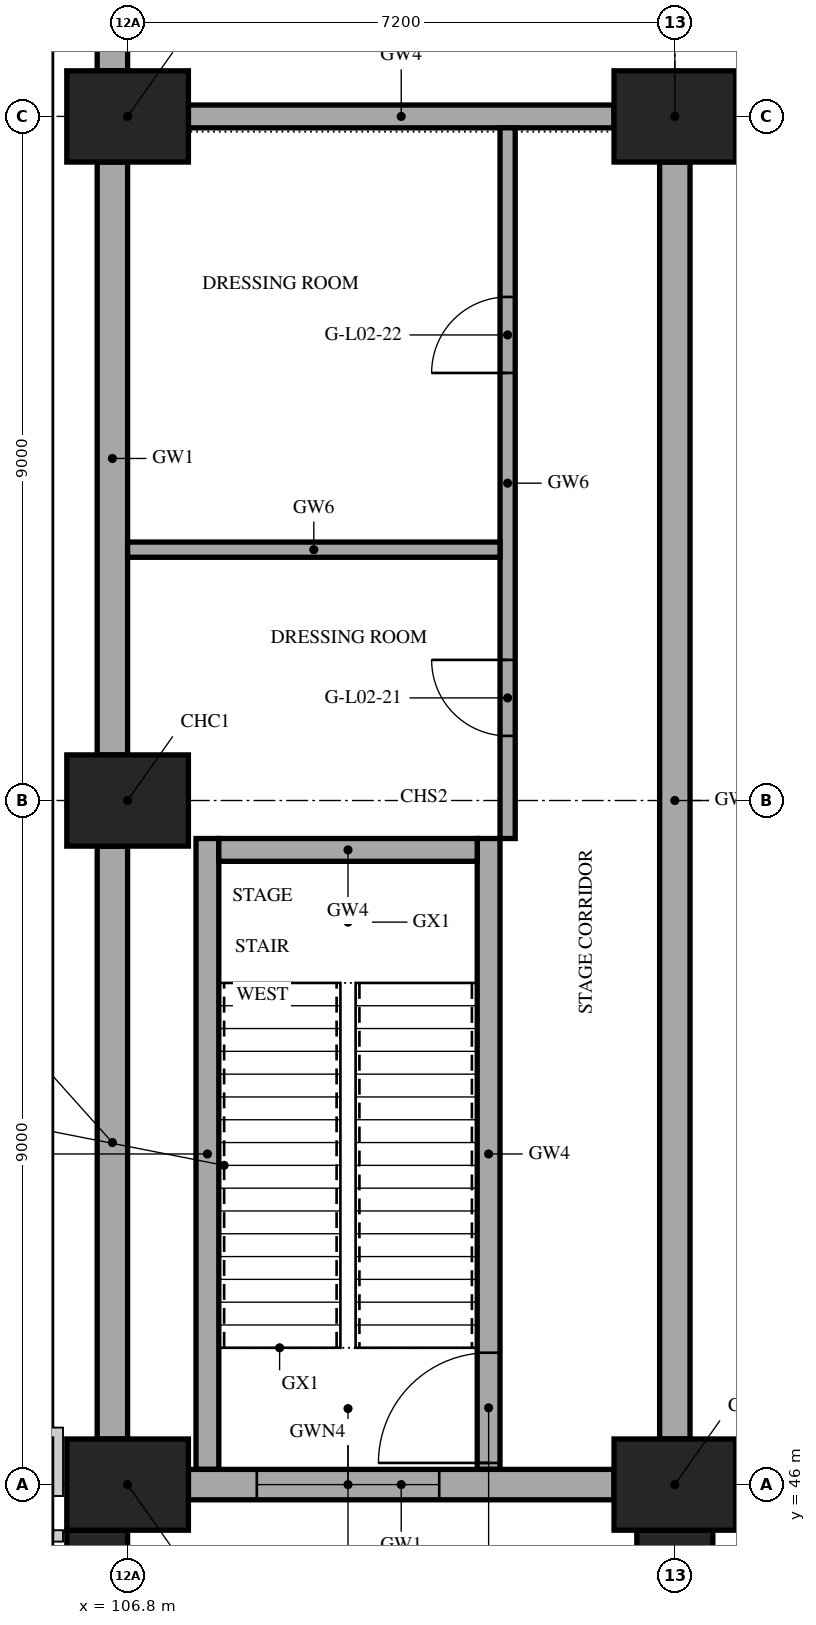
"""IFC4 building model, lengths in metres.
Left out: names, types, materials, properties, quantities, classifications, styles, units other than length and angle.
Written with IfcOpenShell. Run it as: python <this file> out.ifc"""

import sys

from ifc_helpers import new_model, si_unit, direction, frame, frame_2d, origin, origin_2d, place, context, subcontext, project, spatial, rectangle, extrude, element, fill, save


model = new_model("IFC4")
c1 = context("Model", 3, precision=1e-05, world=origin(), true_north=direction((0.0, 1.0)))
c2 = subcontext(c1, "Body", "Model", "MODEL_VIEW")
j1 = project(units=[si_unit("LENGTHUNIT", "METRE"), si_unit("PLANEANGLEUNIT", "RADIAN")], contexts=[c1])
p1 = place(None, origin())
s1 = spatial("IfcSite", under=j1, at=p1, CompositionType="ELEMENT")
p2 = place(p1, origin())
s2 = spatial("IfcBuilding", under=s1, at=p2, CompositionType="ELEMENT")
p3 = place(p2, frame((0.0, 0.0, 10.0)))
s3 = spatial("IfcBuildingStorey", under=s2, at=p3, CompositionType="ELEMENT", Elevation=10.0)
p4 = place(p3, frame((106.4, 44.9, 0.0), z_axis=(0.0, 0.0, 1.0), x_axis=(1.0, 0.0, 0.0)))
e1 = element("IfcColumn", 1, at=p4, inside=s3, PredefinedType="COLUMN", context=c2, shape_type="SweptSolid", body=[
    extrude(rectangle(XDim=0.8, YDim=1.0, at=origin_2d()), origin(), (0.0, 0.0, 1.0), 3.4),
])
p5 = place(p3, frame((114.0, 44.9, 0.0), z_axis=(0.0, 0.0, 1.0), x_axis=(1.0, 0.0, 0.0)))
e2 = element("IfcColumn", 2, at=p5, inside=s3, PredefinedType="COLUMN", context=c2, shape_type="SweptSolid", body=[
    extrude(rectangle(XDim=1.0, YDim=1.0, at=origin_2d()), origin(), (0.0, 0.0, 1.0), 3.4),
])
for number, where, z_axis, x_axis in (
    (3, (106.8, 46.0, 0.0), (0.0, 0.0, 1.0), (1.0, 0.0, 0.0)),
    (4, (114.0, 46.0, 0.0), (0.0, 0.0, 1.0), (1.0, 0.0, 0.0)),
    (5, (106.8, 55.0, 0.0), (0.0, 0.0, 1.0), (1.0, 0.0, 0.0)),
    (6, (106.8, 64.0, 0.0), (0.0, 0.0, 1.0), (1.0, 0.0, 0.0)),
    (7, (114.0, 64.0, 0.0), (0.0, 0.0, 1.0), (1.0, 0.0, 0.0)),
):
    element("IfcColumn", number, at=place(p3, frame(where, z_axis=z_axis, x_axis=x_axis)), inside=s3, PredefinedType="COLUMN", context=c2, shape_type="SweptSolid", body=[
        extrude(rectangle(XDim=1.6, YDim=1.2, at=origin_2d()), origin(), (0.0, 0.0, 1.0), 5.0),
    ])
p6 = place(p3, frame((114.0, 46.6, 0.0), z_axis=(0.0, 0.0, 1.0), x_axis=(0.0, 1.0, 0.0)))
e8 = element("IfcWall", 8, at=p6, inside=s3, PredefinedType="SHEAR", context=c2, shape_type="SweptSolid", body=[
    extrude(rectangle(XDim=16.8, YDim=0.4, at=frame_2d((8.4, 0.0))), origin(), (0.0, 0.0, 1.0), 5.0),
])
p7 = place(p3, frame((107.6, 64.0, 0.0), z_axis=(0.0, 0.0, 1.0), x_axis=(1.0, 0.0, 0.0)))
e9 = element("IfcWall", 9, at=p7, inside=s3, PredefinedType="SHEAR", context=c2, shape_type="SweptSolid", body=[
    extrude(rectangle(XDim=5.6, YDim=0.3, at=frame_2d((2.8, 0.0))), origin(), (0.0, 0.0, 1.0), 5.0),
])
p8 = place(p3, frame((107.85, 46.2, 0.0), z_axis=(0.0, 0.0, 1.0), x_axis=(0.0, 1.0, 0.0)))
e10 = element("IfcWall", 10, at=p8, inside=s3, PredefinedType="SHEAR", context=c2, shape_type="SweptSolid", body=[
    extrude(rectangle(XDim=8.3, YDim=0.3, at=frame_2d((4.15, 0.0))), origin(), (0.0, 0.0, 1.0), 5.0),
])
p9 = place(p3, frame((111.55, 46.2, 0.0), z_axis=(0.0, 0.0, 1.0), x_axis=(0.0, 1.0, 0.0)))
e11 = element("IfcWall", 11, at=p9, inside=s3, PredefinedType="SHEAR", context=c2, shape_type="SweptSolid", body=[
    extrude(rectangle(XDim=8.3, YDim=0.3, at=frame_2d((4.15, 0.0))), origin(), (0.0, 0.0, 1.0), 5.0),
])
p10 = place(p9, frame((0.085, 0.0, 0.0)))
e12 = element("IfcOpeningElement", 12, at=p10, cuts=e11, PredefinedType="OPENING", context=c2, shape_type="SweptSolid", body=[
    extrude(rectangle(XDim=1.45, YDim=2.1, at=frame_2d((0.725, 1.05))), frame((0.0, 0.16, 0.0), z_axis=(0.0, -1.0, 0.0), x_axis=(1.0, 0.0, 0.0)), (0.0, 0.0, 1.0), 0.32),
])
p11 = place(p3, frame((108.0, 54.35, 0.0), z_axis=(0.0, 0.0, 1.0), x_axis=(1.0, 0.0, 0.0)))
e13 = element("IfcWall", 13, at=p11, inside=s3, PredefinedType="SHEAR", context=c2, shape_type="SweptSolid", body=[
    extrude(rectangle(XDim=3.4, YDim=0.3, at=frame_2d((1.7, 0.0))), origin(), (0.0, 0.0, 1.0), 5.0),
])
for number, where, z_axis, x_axis in (
    (14, (106.6, 46.6, 0.0), (0.0, 0.0, 1.0), (0.0, 1.0, 0.0)),
    (15, (106.6, 55.6, 0.0), (0.0, 0.0, 1.0), (0.0, 1.0, 0.0)),
    (16, (106.6, 64.6, 0.0), (0.0, 0.0, 1.0), (0.0, 1.0, 0.0)),
):
    element("IfcWall", number, at=place(p3, frame(where, z_axis=z_axis, x_axis=x_axis)), inside=s3, PredefinedType="SOLIDWALL", context=c2, shape_type="SweptSolid", body=[
        extrude(rectangle(XDim=7.8, YDim=0.4, at=frame_2d((3.9, 0.0))), origin(), (0.0, 0.0, 1.0), 5.0),
    ])
p12 = place(p3, frame((107.6, 46.0, 0.0), z_axis=(0.0, 0.0, 1.0), x_axis=(1.0, 0.0, 0.0)))
e17 = element("IfcWall", 17, at=p12, inside=s3, PredefinedType="SOLIDWALL", context=c2, shape_type="SweptSolid", body=[
    extrude(rectangle(XDim=5.6, YDim=0.4, at=frame_2d((2.8, 0.0))), origin(), (0.0, 0.0, 1.0), 5.0),
])
p13 = place(p12, frame((0.9, 0.0, 1.2)))
e18 = element("IfcOpeningElement", 18, at=p13, cuts=e17, PredefinedType="OPENING", context=c2, shape_type="SweptSolid", body=[
    extrude(rectangle(XDim=2.4, YDim=1.8, at=frame_2d((1.2, 0.9))), frame((0.0, 0.21, 0.0), z_axis=(0.0, -1.0, 0.0), x_axis=(1.0, 0.0, 0.0)), (0.0, 0.0, 1.0), 0.42),
])
p14 = place(p3, frame((111.8, 54.5, 0.0), z_axis=(0.0, 0.0, 1.0), x_axis=(0.0, 1.0, 0.0)))
e19 = element("IfcWall", 19, at=p14, inside=s3, PredefinedType="PARTITIONING", context=c2, shape_type="SweptSolid", body=[
    extrude(rectangle(XDim=9.35, YDim=0.2, at=frame_2d((4.675, 0.0))), origin(), (0.0, 0.0, 1.0), 4.7),
])
p15 = place(p14, frame((1.35, 0.0, 0.0)))
e20 = element("IfcOpeningElement", 20, at=p15, cuts=e19, PredefinedType="OPENING", context=c2, shape_type="SweptSolid", body=[
    extrude(rectangle(XDim=1.0, YDim=2.1, at=frame_2d((0.5, 1.05))), frame((0.0, 0.11, 0.0), z_axis=(0.0, -1.0, 0.0), x_axis=(1.0, 0.0, 0.0)), (0.0, 0.0, 1.0), 0.22),
])
p16 = place(p14, frame((6.125, 0.0, 0.0)))
e21 = element("IfcOpeningElement", 21, at=p16, cuts=e19, PredefinedType="OPENING", context=c2, shape_type="SweptSolid", body=[
    extrude(rectangle(XDim=1.0, YDim=2.1, at=frame_2d((0.5, 1.05))), frame((0.0, 0.11, 0.0), z_axis=(0.0, -1.0, 0.0), x_axis=(1.0, 0.0, 0.0)), (0.0, 0.0, 1.0), 0.22),
])
p17 = place(p3, frame((106.8, 58.3, 0.0), z_axis=(0.0, 0.0, 1.0), x_axis=(1.0, 0.0, 0.0)))
e22 = element("IfcWall", 22, at=p17, inside=s3, PredefinedType="PARTITIONING", context=c2, shape_type="SweptSolid", body=[
    extrude(rectangle(XDim=4.9, YDim=0.2, at=frame_2d((2.45, 0.0))), origin(), (0.0, 0.0, 1.0), 4.7),
])
p18 = place(p13, origin())
e23 = element("IfcWindow", 23, at=p18, inside=s3, PartitioningType="SINGLE_PANEL", PredefinedType="WINDOW", context=c2, shape_type="SweptSolid", body=[
    extrude(rectangle(XDim=2.4, YDim=1.8, at=frame_2d((1.2, 0.9))), frame((0.0, 0.03, 0.0), z_axis=(0.0, -1.0, 0.0), x_axis=(1.0, 0.0, 0.0)), (0.0, 0.0, 1.0), 0.06),
])
fill(e18, e23)
p19 = place(p10, origin())
e24 = element("IfcDoor", 24, at=p19, inside=s3, OperationType="SINGLE_SWING_LEFT", PredefinedType="DOOR", context=c2, shape_type="SweptSolid", body=[
    extrude(rectangle(XDim=1.45, YDim=2.1, at=frame_2d((0.725, 1.05))), frame((0.0, 0.025, 0.0), z_axis=(0.0, -1.0, 0.0), x_axis=(1.0, 0.0, 0.0)), (0.0, 0.0, 1.0), 0.05),
])
fill(e12, e24)
p20 = place(p15, origin())
e25 = element("IfcDoor", 25, at=p20, inside=s3, OperationType="SINGLE_SWING_RIGHT", PredefinedType="DOOR", context=c2, shape_type="SweptSolid", body=[
    extrude(rectangle(XDim=1.0, YDim=2.1, at=frame_2d((0.5, 1.05))), frame((0.0, 0.025, 0.0), z_axis=(0.0, -1.0, 0.0), x_axis=(1.0, 0.0, 0.0)), (0.0, 0.0, 1.0), 0.05),
])
fill(e20, e25)
p21 = place(p16, origin())
e26 = element("IfcDoor", 26, at=p21, inside=s3, OperationType="SINGLE_SWING_LEFT", PredefinedType="DOOR", context=c2, shape_type="SweptSolid", body=[
    extrude(rectangle(XDim=1.0, YDim=2.1, at=frame_2d((0.5, 1.05))), frame((0.0, 0.025, 0.0), z_axis=(0.0, -1.0, 0.0), x_axis=(1.0, 0.0, 0.0)), (0.0, 0.0, 1.0), 0.05),
])
fill(e21, e26)
save(model, sys.argv[1])
